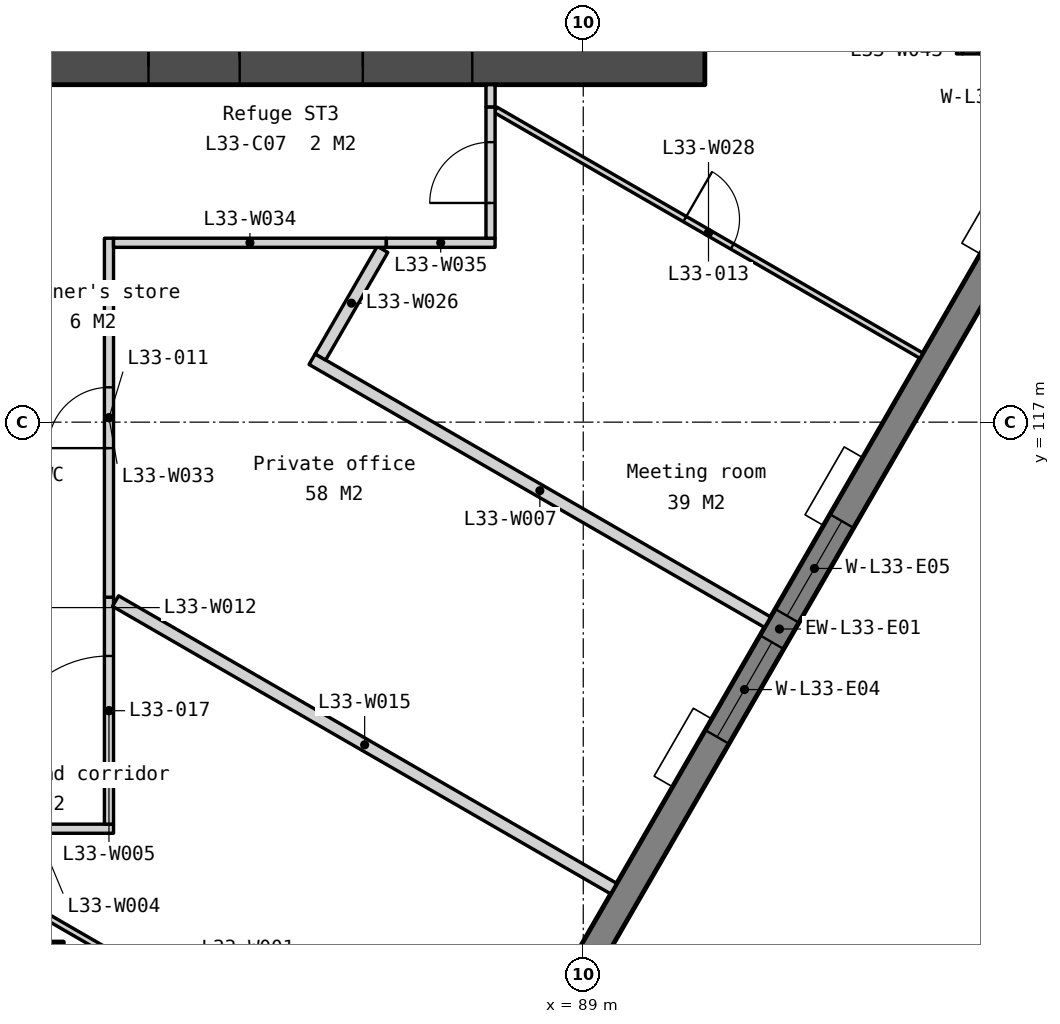
"""IFC4 building model, lengths in metres.
Left out: names, types, materials, properties, quantities, classifications, styles, units other than length and angle.
Written with IfcOpenShell. Run it as: python <this file> out.ifc"""

import sys

from ifc_helpers import new_model, si_unit, direction, frame, frame_2d, origin, origin_2d, place, context, subcontext, project, spatial, polyline, rectangle, outline, extrude, element, fill, save


model = new_model("IFC4")
c1 = context("Model", 3, precision=1e-05, world=origin(), true_north=direction((0.0, 1.0)))
c2 = subcontext(c1, "Body", "Model", "MODEL_VIEW")
j1 = project(units=[si_unit("LENGTHUNIT", "METRE"), si_unit("PLANEANGLEUNIT", "RADIAN")], contexts=[c1])
p1 = place(None, origin())
s1 = spatial("IfcSite", under=j1, at=p1, CompositionType="ELEMENT")
p2 = place(p1, origin())
s2 = spatial("IfcBuilding", under=s1, at=p2, CompositionType="ELEMENT")
p3 = place(p2, frame((0.0, 0.0, 132.5)))
s3 = spatial("IfcBuildingStorey", under=s2, at=p3, CompositionType="ELEMENT", Elevation=132.5)
p4 = place(p3, frame((80.0, 108.0, 0.0), z_axis=(0.0, 0.0, 1.0), x_axis=(1.0, 0.0, 0.0)))
e1 = element("IfcColumn", 1, at=p4, inside=s3, PredefinedType="COLUMN", context=c2, shape_type="SweptSolid", body=[
    extrude(rectangle(XDim=0.9, YDim=0.9, at=origin_2d()), origin(), (0.0, 0.0, 1.0), 3.9),
])
p5 = place(p3, frame((69.0, 122.85, 0.0), z_axis=(0.0, 0.0, 1.0), x_axis=(1.0, 0.0, 0.0)))
e2 = element("IfcWall", 2, at=p5, inside=s3, PredefinedType="SOLIDWALL", context=c2, shape_type="SweptSolid", body=[
    extrude(rectangle(XDim=22.0, YDim=0.6, at=frame_2d((11.0, 0.0))), origin(), (0.0, 0.0, 1.0), 3.75),
])
p6 = place(p5, frame((16.375, 0.0, 0.0)))
e3 = element("IfcOpeningElement", 3, at=p6, cuts=e2, PredefinedType="OPENING", context=c2, shape_type="SweptSolid", body=[
    extrude(rectangle(XDim=1.8, YDim=2.1, at=frame_2d((0.9, 1.05))), frame((0.0, 0.31, 0.0), z_axis=(0.0, -1.0, 0.0), x_axis=(1.0, 0.0, 0.0)), (0.0, 0.0, 1.0), 0.62),
])
p7 = place(p5, frame((3.825, 0.0, 0.0)))
e4 = element("IfcOpeningElement", 4, at=p7, cuts=e2, PredefinedType="OPENING", context=c2, shape_type="SweptSolid", body=[
    extrude(rectangle(XDim=1.8, YDim=2.1, at=frame_2d((0.9, 1.05))), frame((0.0, 0.31, 0.0), z_axis=(0.0, -1.0, 0.0), x_axis=(1.0, 0.0, 0.0)), (0.0, 0.0, 1.0), 0.62),
])
p8 = place(p5, frame((12.85, 0.0, 0.0)))
e5 = element("IfcOpeningElement", 5, at=p8, cuts=e2, PredefinedType="OPENING", context=c2, shape_type="SweptSolid", body=[
    extrude(rectangle(XDim=1.5, YDim=2.1, at=frame_2d((0.75, 1.05))), frame((0.0, 0.31, 0.0), z_axis=(0.0, -1.0, 0.0), x_axis=(1.0, 0.0, 0.0)), (0.0, 0.0, 1.0), 0.62),
])
p9 = place(p3, frame((82.105, 96.067, -0.15), z_axis=(0.0, 0.0, 1.0), x_axis=(0.499997369791, 0.866026922331, 0.0)))
e6 = element("IfcWall", 6, at=p9, inside=s3, PredefinedType="SOLIDWALL", context=c2, shape_type="SweptSolid", body=[
    extrude(outline(polyline([(40.486, 0.0), (40.486, 3.9), (0.0, 3.9), (0.0, 0.0), (40.486, 0.0)])), frame((0.0, 0.225, 0.0), z_axis=(0.0, -1.0, 0.0), x_axis=(1.0, 0.0, 0.0)), (0.0, 0.0, 1.0), 0.45),
])
p10 = place(p9, frame((0.837, 0.0, 0.95)))
e7 = element("IfcOpeningElement", 7, at=p10, cuts=e6, PredefinedType="OPENING", context=c2, shape_type="SweptSolid", body=[
    extrude(rectangle(XDim=1.2, YDim=2.2, at=frame_2d((0.6, 1.1))), frame((0.0, 0.235, 0.0), z_axis=(0.0, -1.0, 0.0), x_axis=(1.0, 0.0, 0.0)), (0.0, 0.0, 1.0), 0.47),
])
p11 = place(p9, frame((8.072, 0.0, 0.95)))
e8 = element("IfcOpeningElement", 8, at=p11, cuts=e6, PredefinedType="OPENING", context=c2, shape_type="SweptSolid", body=[
    extrude(rectangle(XDim=1.8, YDim=2.2, at=frame_2d((0.9, 1.1))), frame((0.0, 0.235, 0.0), z_axis=(0.0, -1.0, 0.0), x_axis=(1.0, 0.0, 0.0)), (0.0, 0.0, 1.0), 0.47),
])
p12 = place(p9, frame((10.372, 0.0, 0.95)))
e9 = element("IfcOpeningElement", 9, at=p12, cuts=e6, PredefinedType="OPENING", context=c2, shape_type="SweptSolid", body=[
    extrude(rectangle(XDim=1.8, YDim=2.2, at=frame_2d((0.9, 1.1))), frame((0.0, 0.235, 0.0), z_axis=(0.0, -1.0, 0.0), x_axis=(1.0, 0.0, 0.0)), (0.0, 0.0, 1.0), 0.47),
])
p13 = place(p9, frame((18.193, 0.0, 0.95)))
e10 = element("IfcOpeningElement", 10, at=p13, cuts=e6, PredefinedType="OPENING", context=c2, shape_type="SweptSolid", body=[
    extrude(rectangle(XDim=1.8, YDim=2.2, at=frame_2d((0.9, 1.1))), frame((0.0, 0.235, 0.0), z_axis=(0.0, -1.0, 0.0), x_axis=(1.0, 0.0, 0.0)), (0.0, 0.0, 1.0), 0.47),
])
p14 = place(p9, frame((20.493, 0.0, 0.95)))
e11 = element("IfcOpeningElement", 11, at=p14, cuts=e6, PredefinedType="OPENING", context=c2, shape_type="SweptSolid", body=[
    extrude(rectangle(XDim=1.8, YDim=2.2, at=frame_2d((0.9, 1.1))), frame((0.0, 0.235, 0.0), z_axis=(0.0, -1.0, 0.0), x_axis=(1.0, 0.0, 0.0)), (0.0, 0.0, 1.0), 0.47),
])
p15 = place(p9, frame((28.315, 0.0, 0.95)))
e12 = element("IfcOpeningElement", 12, at=p15, cuts=e6, PredefinedType="OPENING", context=c2, shape_type="SweptSolid", body=[
    extrude(rectangle(XDim=1.8, YDim=2.2, at=frame_2d((0.9, 1.1))), frame((0.0, 0.235, 0.0), z_axis=(0.0, -1.0, 0.0), x_axis=(1.0, 0.0, 0.0)), (0.0, 0.0, 1.0), 0.47),
])
p16 = place(p9, frame((30.615, 0.0, 0.95)))
e13 = element("IfcOpeningElement", 13, at=p16, cuts=e6, PredefinedType="OPENING", context=c2, shape_type="SweptSolid", body=[
    extrude(rectangle(XDim=1.8, YDim=2.2, at=frame_2d((0.9, 1.1))), frame((0.0, 0.235, 0.0), z_axis=(0.0, -1.0, 0.0), x_axis=(1.0, 0.0, 0.0)), (0.0, 0.0, 1.0), 0.47),
])
p17 = place(p9, frame((38.449, 0.0, 0.95)))
e14 = element("IfcOpeningElement", 14, at=p17, cuts=e6, PredefinedType="OPENING", context=c2, shape_type="SweptSolid", body=[
    extrude(rectangle(XDim=1.2, YDim=2.2, at=frame_2d((0.6, 1.1))), frame((0.0, 0.235, 0.0), z_axis=(0.0, -1.0, 0.0), x_axis=(1.0, 0.0, 0.0)), (0.0, 0.0, 1.0), 0.47),
])
p18 = place(p3, frame((80.0, 108.969, 0.0), z_axis=(0.0, 0.0, 1.0), x_axis=(0.86602648383, -0.499998129301, 0.0)))
e15 = element("IfcWall", 15, at=p18, inside=s3, PredefinedType="PARTITIONING", context=c2, shape_type="SweptSolid", body=[
    extrude(rectangle(XDim=8.049, YDim=0.1, at=frame_2d((4.025, 0.0))), origin(), (0.0, 0.0, 1.0), 3.75),
])
p19 = place(p18, frame((3.525, 0.0, 0.0)))
e16 = element("IfcOpeningElement", 16, at=p19, cuts=e15, PredefinedType="OPENING", context=c2, shape_type="SweptSolid", body=[
    extrude(rectangle(XDim=1.0, YDim=2.1, at=frame_2d((0.5, 1.05))), frame((0.0, 0.06, 0.0), z_axis=(0.0, -1.0, 0.0), x_axis=(1.0, 0.0, 0.0)), (0.0, 0.0, 1.0), 0.12),
])
p20 = place(p3, frame((78.725, 110.313, 0.0), z_axis=(0.0, 0.0, 1.0), x_axis=(1.0, 0.0, 0.0)))
e17 = element("IfcWall", 17, at=p20, inside=s3, PredefinedType="PARTITIONING", context=c2, shape_type="SweptSolid", body=[
    extrude(rectangle(XDim=2.55, YDim=0.15, at=frame_2d((1.275, 0.0))), origin(), (0.0, 0.0, 1.0), 3.75),
])
p21 = place(p3, frame((81.2, 110.388, 0.0), z_axis=(0.0, 0.0, 1.0), x_axis=(0.0, 1.0, 0.0)))
e18 = element("IfcWall", 18, at=p21, inside=s3, PredefinedType="PARTITIONING", context=c2, shape_type="SweptSolid", body=[
    extrude(rectangle(XDim=3.732, YDim=0.15, at=frame_2d((1.866, 0.0))), origin(), (0.0, 0.0, 1.0), 3.75),
])
p22 = place(p21, frame((0.966, 0.0, 0.0)))
e19 = element("IfcOpeningElement", 19, at=p22, cuts=e18, PredefinedType="OPENING", context=c2, shape_type="SweptSolid", body=[
    extrude(rectangle(XDim=1.8, YDim=2.1, at=frame_2d((0.9, 1.05))), frame((0.0, 0.085, 0.0), z_axis=(0.0, -1.0, 0.0), x_axis=(1.0, 0.0, 0.0)), (0.0, 0.0, 1.0), 0.17),
])
p23 = place(p3, frame((84.541, 118.035, 0.0), z_axis=(0.0, 0.0, 1.0), x_axis=(0.866023427642, -0.500003422764, 0.0)))
e20 = element("IfcWall", 20, at=p23, inside=s3, PredefinedType="PARTITIONING", context=c2, shape_type="SweptSolid", body=[
    extrude(rectangle(XDim=8.65, YDim=0.2, at=frame_2d((4.325, 0.0))), origin(), (0.0, 0.0, 1.0), 3.75),
])
p24 = place(p3, frame((81.308, 114.058, 0.0), z_axis=(0.0, 0.0, 1.0), x_axis=(0.866017555821, -0.500013592824, 0.0)))
e21 = element("IfcWall", 21, at=p24, inside=s3, PredefinedType="PARTITIONING", context=c2, shape_type="SweptSolid", body=[
    extrude(rectangle(XDim=9.461, YDim=0.2, at=frame_2d((4.73, 0.0))), origin(), (0.0, 0.0, 1.0), 3.75),
])
p25 = place(p3, frame((84.677, 118.072, 0.0), z_axis=(0.0, 0.0, 1.0), x_axis=(0.500018862428, 0.866014513283, 0.0)))
e22 = element("IfcWall", 22, at=p25, inside=s3, PredefinedType="PARTITIONING", context=c2, shape_type="SweptSolid", body=[
    extrude(rectangle(XDim=2.044, YDim=0.2, at=frame_2d((1.022, 0.0))), origin(), (0.0, 0.0, 1.0), 3.75),
])
p26 = place(p3, frame((87.557, 122.137, 0.0), z_axis=(0.0, 0.0, 1.0), x_axis=(0.866029768103, -0.499992440702, 0.0)))
e23 = element("IfcWall", 23, at=p26, inside=s3, PredefinedType="PARTITIONING", context=c2, shape_type="SweptSolid", body=[
    extrude(rectangle(XDim=8.089, YDim=0.1, at=frame_2d((4.044, 0.0))), origin(), (0.0, 0.0, 1.0), 3.75),
])
p27 = place(p26, frame((3.594, 0.0, 0.0)))
e24 = element("IfcOpeningElement", 24, at=p27, cuts=e23, PredefinedType="OPENING", context=c2, shape_type="SweptSolid", body=[
    extrude(rectangle(XDim=0.9, YDim=2.1, at=frame_2d((0.45, 1.05))), frame((0.0, 0.06, 0.0), z_axis=(0.0, -1.0, 0.0), x_axis=(1.0, 0.0, 0.0)), (0.0, 0.0, 1.0), 0.12),
])
p28 = place(p3, frame((81.2, 114.12, 0.0), z_axis=(0.0, 0.0, 1.0), x_axis=(0.0, 1.0, 0.0)))
e25 = element("IfcWall", 25, at=p28, inside=s3, PredefinedType="PARTITIONING", context=c2, shape_type="SweptSolid", body=[
    extrude(rectangle(XDim=5.905, YDim=0.15, at=frame_2d((2.952, 0.0))), origin(), (0.0, 0.0, 1.0), 3.75),
])
p29 = place(p28, frame((2.452, 0.0, 0.0)))
e26 = element("IfcOpeningElement", 26, at=p29, cuts=e25, PredefinedType="OPENING", context=c2, shape_type="SweptSolid", body=[
    extrude(rectangle(XDim=1.0, YDim=2.1, at=frame_2d((0.5, 1.05))), frame((0.0, 0.085, 0.0), z_axis=(0.0, -1.0, 0.0), x_axis=(1.0, 0.0, 0.0)), (0.0, 0.0, 1.0), 0.17),
])
p30 = place(p3, frame((81.275, 119.95, 0.0), z_axis=(0.0, 0.0, 1.0), x_axis=(1.0, 0.0, 0.0)))
e27 = element("IfcWall", 27, at=p30, inside=s3, PredefinedType="PARTITIONING", context=c2, shape_type="SweptSolid", body=[
    extrude(rectangle(XDim=4.487, YDim=0.15, at=frame_2d((2.243, 0.0))), origin(), (0.0, 0.0, 1.0), 3.75),
])
p31 = place(p3, frame((85.762, 119.95, 0.0), z_axis=(0.0, 0.0, 1.0), x_axis=(1.0, 0.0, 0.0)))
e28 = element("IfcWall", 28, at=p31, inside=s3, PredefinedType="PARTITIONING", context=c2, shape_type="SweptSolid", body=[
    extrude(rectangle(XDim=1.788, YDim=0.15, at=frame_2d((0.894, 0.0))), origin(), (0.0, 0.0, 1.0), 3.75),
])
p32 = place(p3, frame((87.475, 120.025, 0.0), z_axis=(0.0, 0.0, 1.0), x_axis=(0.0, 1.0, 0.0)))
e29 = element("IfcWall", 29, at=p32, inside=s3, PredefinedType="PARTITIONING", context=c2, shape_type="SweptSolid", body=[
    extrude(rectangle(XDim=2.16, YDim=0.15, at=frame_2d((1.08, 0.0))), origin(), (0.0, 0.0, 1.0), 3.75),
])
p33 = place(p32, frame((0.58, 0.0, 0.0)))
e30 = element("IfcOpeningElement", 30, at=p33, cuts=e29, PredefinedType="OPENING", context=c2, shape_type="SweptSolid", body=[
    extrude(rectangle(XDim=1.0, YDim=2.1, at=frame_2d((0.5, 1.05))), frame((0.0, 0.085, 0.0), z_axis=(0.0, -1.0, 0.0), x_axis=(1.0, 0.0, 0.0)), (0.0, 0.0, 1.0), 0.17),
])
p34 = place(p3, frame((87.475, 122.185, 0.0), z_axis=(0.0, 0.0, 1.0), x_axis=(0.0, 1.0, 0.0)))
e31 = element("IfcWall", 31, at=p34, inside=s3, PredefinedType="PARTITIONING", context=c2, shape_type="SweptSolid", body=[
    extrude(rectangle(XDim=0.365, YDim=0.15, at=frame_2d((0.183, 0.0))), origin(), (0.0, 0.0, 1.0), 3.75),
])
p35 = place(p3, frame((95.189, 123.057, 0.0), z_axis=(0.0, 0.0, 1.0), x_axis=(0.0, 1.0, 0.0)))
e32 = element("IfcWall", 32, at=p35, inside=s3, PredefinedType="PARTITIONING", context=c2, shape_type="SweptSolid", body=[
    extrude(rectangle(XDim=4.5, YDim=0.1, at=frame_2d((2.25, 0.0))), origin(), (0.0, 0.0, 1.0), 3.75),
])
p36 = place(p35, frame((1.8, 0.0, 0.0)))
e33 = element("IfcOpeningElement", 33, at=p36, cuts=e32, PredefinedType="OPENING", context=c2, shape_type="SweptSolid", body=[
    extrude(rectangle(XDim=0.9, YDim=2.1, at=frame_2d((0.45, 1.05))), frame((0.0, 0.06, 0.0), z_axis=(0.0, -1.0, 0.0), x_axis=(1.0, 0.0, 0.0)), (0.0, 0.0, 1.0), 0.12),
])
p37 = place(p3, frame((95.239, 123.107, 0.0), z_axis=(0.0, 0.0, 1.0), x_axis=(0.999999909769, -0.000424808798, 0.0)))
e34 = element("IfcWall", 34, at=p37, inside=s3, PredefinedType="PARTITIONING", context=c2, shape_type="SweptSolid", body=[
    extrude(rectangle(XDim=0.575, YDim=0.1, at=frame_2d((0.287, 0.0))), origin(), (0.0, 0.0, 1.0), 3.75),
])
p38 = place(p6, origin())
e35 = element("IfcDoor", 35, at=p38, inside=s3, OperationType="DOUBLE_DOOR_DOUBLE_SWING", PredefinedType="DOOR", context=c2, shape_type="SweptSolid", body=[
    extrude(rectangle(XDim=1.8, YDim=2.1, at=frame_2d((0.9, 1.05))), frame((0.0, 0.025, 0.0), z_axis=(0.0, -1.0, 0.0), x_axis=(1.0, 0.0, 0.0)), (0.0, 0.0, 1.0), 0.05),
])
fill(e3, e35)
p39 = place(p8, origin())
e36 = element("IfcDoor", 36, at=p39, inside=s3, OperationType="DOUBLE_DOOR_DOUBLE_SWING", PredefinedType="DOOR", context=c2, shape_type="SweptSolid", body=[
    extrude(rectangle(XDim=1.5, YDim=2.1, at=frame_2d((0.75, 1.05))), frame((0.0, 0.025, 0.0), z_axis=(0.0, -1.0, 0.0), x_axis=(1.0, 0.0, 0.0)), (0.0, 0.0, 1.0), 0.05),
])
fill(e5, e36)
p40 = place(p13, origin())
e37 = element("IfcWindow", 37, at=p40, inside=s3, PartitioningType="SINGLE_PANEL", PredefinedType="WINDOW", context=c2, shape_type="SweptSolid", body=[
    extrude(rectangle(XDim=1.8, YDim=2.2, at=frame_2d((0.9, 1.1))), frame((0.0, 0.03, 0.0), z_axis=(0.0, -1.0, 0.0), x_axis=(1.0, 0.0, 0.0)), (0.0, 0.0, 1.0), 0.06),
])
fill(e10, e37)
p41 = place(p14, origin())
e38 = element("IfcWindow", 38, at=p41, inside=s3, PartitioningType="SINGLE_PANEL", PredefinedType="WINDOW", context=c2, shape_type="SweptSolid", body=[
    extrude(rectangle(XDim=1.8, YDim=2.2, at=frame_2d((0.9, 1.1))), frame((0.0, 0.03, 0.0), z_axis=(0.0, -1.0, 0.0), x_axis=(1.0, 0.0, 0.0)), (0.0, 0.0, 1.0), 0.06),
])
fill(e11, e38)
p42 = place(p29, origin())
e39 = element("IfcDoor", 39, at=p42, inside=s3, OperationType="SINGLE_SWING_LEFT", PredefinedType="DOOR", context=c2, shape_type="SweptSolid", body=[
    extrude(rectangle(XDim=1.0, YDim=2.1, at=frame_2d((0.5, 1.05))), frame((0.0, 0.025, 0.0), z_axis=(0.0, -1.0, 0.0), x_axis=(1.0, 0.0, 0.0)), (0.0, 0.0, 1.0), 0.05),
])
fill(e26, e39)
p43 = place(p33, origin())
e40 = element("IfcDoor", 40, at=p43, inside=s3, OperationType="SINGLE_SWING_LEFT", PredefinedType="DOOR", context=c2, shape_type="SweptSolid", body=[
    extrude(rectangle(XDim=1.0, YDim=2.1, at=frame_2d((0.5, 1.05))), frame((0.0, 0.025, 0.0), z_axis=(0.0, -1.0, 0.0), x_axis=(1.0, 0.0, 0.0)), (0.0, 0.0, 1.0), 0.05),
])
fill(e30, e40)
p44 = place(p27, origin())
e41 = element("IfcDoor", 41, at=p44, inside=s3, OperationType="SINGLE_SWING_LEFT", PredefinedType="DOOR", context=c2, shape_type="SweptSolid", body=[
    extrude(rectangle(XDim=0.9, YDim=2.1, at=frame_2d((0.45, 1.05))), frame((0.0, 0.025, 0.0), z_axis=(0.0, -1.0, 0.0), x_axis=(1.0, 0.0, 0.0)), (0.0, 0.0, 1.0), 0.05),
])
fill(e24, e41)
p45 = place(p22, origin())
e42 = element("IfcDoor", 42, at=p45, inside=s3, OperationType="SINGLE_SWING_LEFT", PredefinedType="DOOR", context=c2, shape_type="SweptSolid", body=[
    extrude(rectangle(XDim=1.8, YDim=2.1, at=frame_2d((0.9, 1.05))), frame((0.0, 0.025, 0.0), z_axis=(0.0, -1.0, 0.0), x_axis=(1.0, 0.0, 0.0)), (0.0, 0.0, 1.0), 0.05),
])
fill(e19, e42)
save(model, sys.argv[1])
